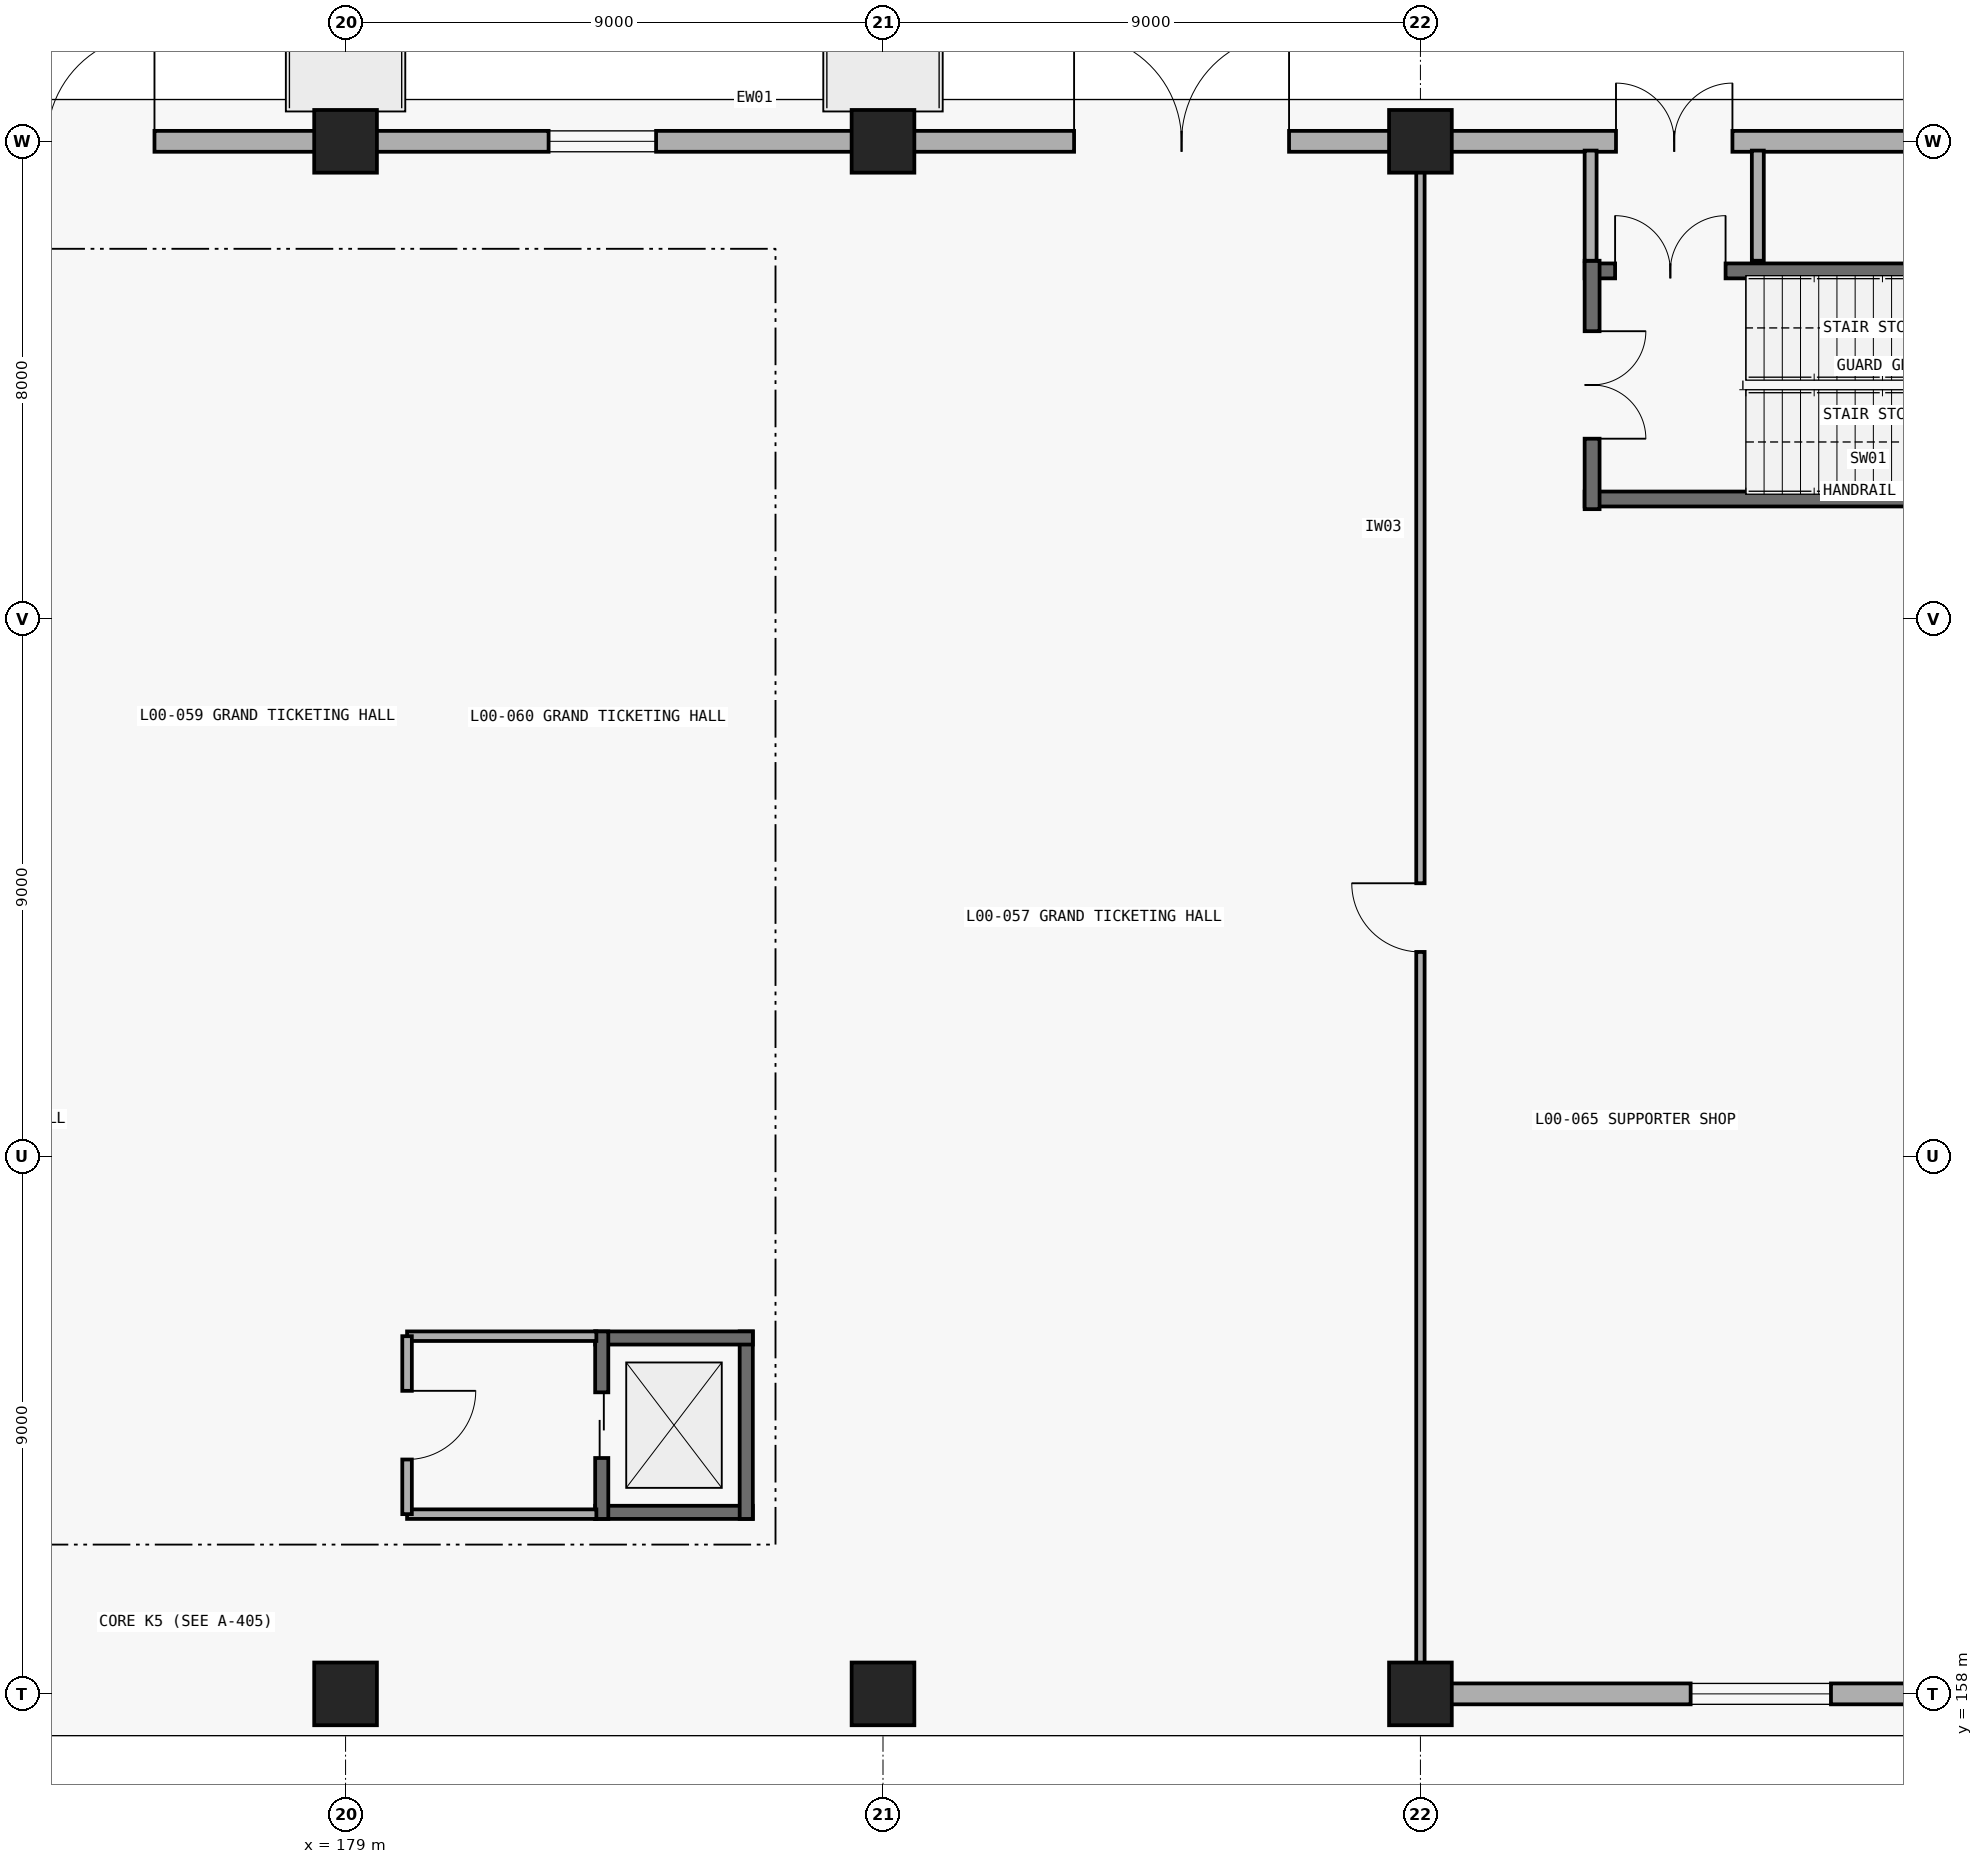
"""IFC4 building model, lengths in metres.
Left out: names, types, materials, properties, quantities, classifications, styles, units other than length and angle.
Written with IfcOpenShell. Run it as: python <this file> out.ifc"""

import sys

from ifc_helpers import new_model, si_unit, direction, frame, frame_2d, origin, origin_2d, place, context, subcontext, project, spatial, rectangle, extrude, element, fill, save


model = new_model("IFC4")
c1 = context("Model", 3, precision=1e-05, world=origin(), true_north=direction((0.0, 1.0)))
c2 = subcontext(c1, "Body", "Model", "MODEL_VIEW")
j1 = project(units=[si_unit("LENGTHUNIT", "METRE"), si_unit("PLANEANGLEUNIT", "RADIAN")], contexts=[c1])
p1 = place(None, origin())
s1 = spatial("IfcSite", under=j1, at=p1, CompositionType="ELEMENT")
p2 = place(p1, origin())
s2 = spatial("IfcBuilding", under=s1, at=p2, CompositionType="ELEMENT")
p3 = place(p2, origin())
s3 = spatial("IfcBuildingStorey", under=s2, at=p3, CompositionType="ELEMENT", Elevation=0.0)
for number, where, z_axis, x_axis in (
    (1, (179.0, 158.0, 0.0), (0.0, 0.0, 1.0), (1.0, 0.0, 0.0)),
    (2, (179.0, 184.0, 0.0), (0.0, 0.0, 1.0), (1.0, 0.0, 0.0)),
    (3, (188.0, 158.0, 0.0), (0.0, 0.0, 1.0), (1.0, 0.0, 0.0)),
    (4, (188.0, 184.0, 0.0), (0.0, 0.0, 1.0), (1.0, 0.0, 0.0)),
    (5, (197.0, 158.0, 0.0), (0.0, 0.0, 1.0), (1.0, 0.0, 0.0)),
    (6, (197.0, 184.0, 0.0), (0.0, 0.0, 1.0), (1.0, 0.0, 0.0)),
):
    element("IfcColumn", number, at=place(p3, frame(where, z_axis=z_axis, x_axis=x_axis)), inside=s3, PredefinedType="COLUMN", context=c2, shape_type="SweptSolid", body=[
        extrude(rectangle(XDim=1.05, YDim=1.05, at=origin_2d()), origin(), (0.0, 0.0, 1.0), 5.4),
    ])
p4 = place(p3, frame((157.593, 156.929, 0.0), z_axis=(0.0, 0.0, 1.0), x_axis=(0.842308733224, -0.538995359845, 0.0)))
e7 = element("IfcWall", 7, at=p4, inside=s3, PredefinedType="STANDARD", context=c2, shape_type="SweptSolid", body=[
    extrude(rectangle(XDim=21.139, YDim=0.35, at=frame_2d((10.57, 0.0))), origin(), (0.0, 0.0, 1.0), 4.165),
])
p5 = place(p4, frame((12.556, 0.0, 0.0)))
e8 = element("IfcOpeningElement", 8, at=p5, cuts=e7, PredefinedType="OPENING", context=c2, shape_type="SweptSolid", body=[
    extrude(rectangle(XDim=1.95, YDim=2.25, at=frame_2d((0.975, 1.125))), frame((0.0, 0.185, 0.0), z_axis=(0.0, -1.0, 0.0), x_axis=(1.0, 0.0, 0.0)), (0.0, 0.0, 1.0), 0.37),
])
p6 = place(p4, frame((1.46, 0.0, 0.0)))
e9 = element("IfcOpeningElement", 9, at=p6, cuts=e7, PredefinedType="OPENING", context=c2, shape_type="SweptSolid", body=[
    extrude(rectangle(XDim=3.0, YDim=2.55, at=frame_2d((1.5, 1.275))), frame((0.0, 0.185, 0.0), z_axis=(0.0, -1.0, 0.0), x_axis=(1.0, 0.0, 0.0)), (0.0, 0.0, 1.0), 0.37),
])
p7 = place(p3, frame((170.5, 184.0, 0.0), z_axis=(0.0, 0.0, 1.0), x_axis=(1.0, 0.0, 0.0)))
e10 = element("IfcWall", 10, at=p7, inside=s3, PredefinedType="STANDARD", context=c2, shape_type="SweptSolid", body=[
    extrude(rectangle(XDim=8.0, YDim=0.35, at=frame_2d((4.0, 0.0))), origin(), (0.0, 0.0, 1.0), 4.384),
])
p8 = place(p7, frame((1.7, 0.0, 0.0)))
e11 = element("IfcOpeningElement", 11, at=p8, cuts=e10, PredefinedType="OPENING", context=c2, shape_type="SweptSolid", body=[
    extrude(rectangle(XDim=3.6, YDim=2.7, at=frame_2d((1.8, 1.35))), frame((0.0, 0.185, 0.0), z_axis=(0.0, -1.0, 0.0), x_axis=(1.0, 0.0, 0.0)), (0.0, 0.0, 1.0), 0.37),
])
p9 = place(p3, frame((179.5, 184.0, 0.0), z_axis=(0.0, 0.0, 1.0), x_axis=(1.0, 0.0, 0.0)))
e12 = element("IfcWall", 12, at=p9, inside=s3, PredefinedType="STANDARD", context=c2, shape_type="SweptSolid", body=[
    extrude(rectangle(XDim=8.0, YDim=0.35, at=frame_2d((4.0, 0.0))), origin(), (0.0, 0.0, 1.0), 4.384),
])
p10 = place(p9, frame((2.9, 0.0, 0.95)))
e13 = element("IfcOpeningElement", 13, at=p10, cuts=e12, PredefinedType="OPENING", context=c2, shape_type="SweptSolid", body=[
    extrude(rectangle(XDim=1.8, YDim=2.2, at=frame_2d((0.9, 1.1))), frame((0.0, 0.185, 0.0), z_axis=(0.0, -1.0, 0.0), x_axis=(1.0, 0.0, 0.0)), (0.0, 0.0, 1.0), 0.37),
])
p11 = place(p3, frame((188.5, 184.0, 0.0), z_axis=(0.0, 0.0, 1.0), x_axis=(1.0, 0.0, 0.0)))
e14 = element("IfcWall", 14, at=p11, inside=s3, PredefinedType="STANDARD", context=c2, shape_type="SweptSolid", body=[
    extrude(rectangle(XDim=8.0, YDim=0.35, at=frame_2d((4.0, 0.0))), origin(), (0.0, 0.0, 1.0), 4.384),
])
p12 = place(p11, frame((2.7, 0.0, 0.0)))
e15 = element("IfcOpeningElement", 15, at=p12, cuts=e14, PredefinedType="OPENING", context=c2, shape_type="SweptSolid", body=[
    extrude(rectangle(XDim=3.6, YDim=2.7, at=frame_2d((1.8, 1.35))), frame((0.0, 0.185, 0.0), z_axis=(0.0, -1.0, 0.0), x_axis=(1.0, 0.0, 0.0)), (0.0, 0.0, 1.0), 0.37),
])
p13 = place(p3, frame((197.5, 184.0, 0.0), z_axis=(0.0, 0.0, 1.0), x_axis=(1.0, 0.0, 0.0)))
e16 = element("IfcWall", 16, at=p13, inside=s3, PredefinedType="STANDARD", context=c2, shape_type="SweptSolid", body=[
    extrude(rectangle(XDim=8.0, YDim=0.35, at=frame_2d((4.0, 0.0))), origin(), (0.0, 0.0, 1.0), 4.384),
])
p14 = place(p13, frame((2.775, 0.0, 0.0)))
e17 = element("IfcOpeningElement", 17, at=p14, cuts=e16, PredefinedType="OPENING", context=c2, shape_type="SweptSolid", body=[
    extrude(rectangle(XDim=1.95, YDim=2.25, at=frame_2d((0.975, 1.125))), frame((0.0, 0.185, 0.0), z_axis=(0.0, -1.0, 0.0), x_axis=(1.0, 0.0, 0.0)), (0.0, 0.0, 1.0), 0.37),
])
p15 = place(p3, frame((205.5, 158.0, 0.0), z_axis=(0.0, 0.0, 1.0), x_axis=(-1.0, 0.0, 0.0)))
e18 = element("IfcWall", 18, at=p15, inside=s3, PredefinedType="STANDARD", context=c2, shape_type="SweptSolid", body=[
    extrude(rectangle(XDim=8.0, YDim=0.35, at=frame_2d((4.0, 0.0))), origin(), (0.0, 0.0, 1.0), 4.384),
])
p16 = place(p15, frame((1.625, 0.0, 0.95)))
e19 = element("IfcOpeningElement", 19, at=p16, cuts=e18, PredefinedType="OPENING", context=c2, shape_type="SweptSolid", body=[
    extrude(rectangle(XDim=2.35, YDim=2.0, at=frame_2d((1.175, 1.0))), frame((0.0, 0.185, 0.0), z_axis=(0.0, -1.0, 0.0), x_axis=(1.0, 0.0, 0.0)), (0.0, 0.0, 1.0), 0.37),
])
p17 = place(p3, frame((199.75, 178.01, 0.0), z_axis=(0.0, 0.0, 1.0), x_axis=(1.0, 0.0, 0.0)))
e20 = element("IfcWall", 20, at=p17, inside=s3, PredefinedType="SHEAR", context=c2, shape_type="SweptSolid", body=[
    extrude(rectangle(XDim=9.5, YDim=0.25, at=frame_2d((4.75, 0.0))), origin(), (0.0, 0.0, 1.0), 5.1),
])
p18 = place(p3, frame((199.75, 181.83, 0.0), z_axis=(0.0, 0.0, 1.0), x_axis=(1.0, 0.0, 0.0)))
e21 = element("IfcWall", 21, at=p18, inside=s3, PredefinedType="SHEAR", context=c2, shape_type="SweptSolid", body=[
    extrude(rectangle(XDim=9.5, YDim=0.25, at=frame_2d((4.75, 0.0))), origin(), (0.0, 0.0, 1.0), 5.1),
])
p19 = place(p18, frame((0.51, 0.0, 0.0)))
e22 = element("IfcOpeningElement", 22, at=p19, cuts=e21, PredefinedType="OPENING", context=c2, shape_type="SweptSolid", body=[
    extrude(rectangle(XDim=1.85, YDim=2.3, at=frame_2d((0.925, 1.15))), frame((0.0, 0.135, 0.0), z_axis=(0.0, -1.0, 0.0), x_axis=(1.0, 0.0, 0.0)), (0.0, 0.0, 1.0), 0.27),
])
p20 = place(p3, frame((199.875, 182.0, 0.0), z_axis=(0.0, 0.0, 1.0), x_axis=(0.0, -1.0, 0.0)))
e23 = element("IfcWall", 23, at=p20, inside=s3, PredefinedType="SHEAR", context=c2, shape_type="SweptSolid", body=[
    extrude(rectangle(XDim=4.16, YDim=0.25, at=frame_2d((2.08, 0.0))), origin(), (0.0, 0.0, 1.0), 5.1),
])
p21 = place(p20, frame((1.18, 0.0, 0.0)))
e24 = element("IfcOpeningElement", 24, at=p21, cuts=e23, PredefinedType="OPENING", context=c2, shape_type="SweptSolid", body=[
    extrude(rectangle(XDim=1.8, YDim=2.25, at=frame_2d((0.9, 1.125))), frame((0.0, 0.135, 0.0), z_axis=(0.0, -1.0, 0.0), x_axis=(1.0, 0.0, 0.0)), (0.0, 0.0, 1.0), 0.27),
])
for number, where, z_axis, x_axis in (
    (25, (199.85, 182.0, 0.0), (0.0, 0.0, 1.0), (0.0, 1.0, 0.0)),
    (26, (202.65, 182.0, 0.0), (0.0, 0.0, 1.0), (0.0, 1.0, 0.0)),
):
    element("IfcWall", number, at=place(p3, frame(where, z_axis=z_axis, x_axis=x_axis)), inside=s3, PredefinedType="PARTITIONING", context=c2, shape_type="SweptSolid", body=[
        extrude(rectangle(XDim=1.845, YDim=0.2, at=frame_2d((0.922, 0.0))), origin(), (0.0, 0.0, 1.0), 4.384),
    ])
p22 = place(p3, frame((183.18, 161.04, 0.0), z_axis=(0.0, 0.0, 1.0), x_axis=(1.0, 0.0, 0.0)))
e27 = element("IfcWall", 27, at=p22, inside=s3, PredefinedType="SHEAR", context=c2, shape_type="SweptSolid", body=[
    extrude(rectangle(XDim=2.64, YDim=0.22, at=frame_2d((1.32, 0.0))), origin(), (0.0, 0.0, 1.0), 5.1),
])
p23 = place(p3, frame((185.71, 160.93, 0.0), z_axis=(0.0, 0.0, 1.0), x_axis=(0.0, 1.0, 0.0)))
e28 = element("IfcWall", 28, at=p23, inside=s3, PredefinedType="SHEAR", context=c2, shape_type="SweptSolid", body=[
    extrude(rectangle(XDim=3.14, YDim=0.22, at=frame_2d((1.57, 0.0))), origin(), (0.0, 0.0, 1.0), 5.1),
])
p24 = place(p3, frame((185.82, 163.96, 0.0), z_axis=(0.0, 0.0, 1.0), x_axis=(-1.0, 0.0, 0.0)))
e29 = element("IfcWall", 29, at=p24, inside=s3, PredefinedType="SHEAR", context=c2, shape_type="SweptSolid", body=[
    extrude(rectangle(XDim=2.64, YDim=0.22, at=frame_2d((1.32, 0.0))), origin(), (0.0, 0.0, 1.0), 5.1),
])
p25 = place(p3, frame((183.29, 164.07, 0.0), z_axis=(0.0, 0.0, 1.0), x_axis=(0.0, -1.0, 0.0)))
e30 = element("IfcWall", 30, at=p25, inside=s3, PredefinedType="SHEAR", context=c2, shape_type="SweptSolid", body=[
    extrude(rectangle(XDim=3.14, YDim=0.22, at=frame_2d((1.57, 0.0))), origin(), (0.0, 0.0, 1.0), 5.1),
])
p26 = place(p25, frame((1.02, 0.0, 0.0)))
e31 = element("IfcOpeningElement", 31, at=p26, cuts=e30, PredefinedType="OPENING", context=c2, shape_type="SweptSolid", body=[
    extrude(rectangle(XDim=1.1, YDim=2.15, at=frame_2d((0.55, 1.075))), frame((0.0, 0.12, 0.0), z_axis=(0.0, -1.0, 0.0), x_axis=(1.0, 0.0, 0.0)), (0.0, 0.0, 1.0), 0.24),
])
for number, where, z_axis, x_axis in (
    (32, (183.2, 163.99, 0.0), (0.0, 0.0, 1.0), (-1.0, 0.0, 0.0)),
    (33, (183.2, 161.01, 0.0), (0.0, 0.0, 1.0), (-1.0, 0.0, 0.0)),
):
    element("IfcWall", number, at=place(p3, frame(where, z_axis=z_axis, x_axis=x_axis)), inside=s3, PredefinedType="PARTITIONING", context=c2, shape_type="SweptSolid", body=[
        extrude(rectangle(XDim=3.17, YDim=0.16, at=frame_2d((1.585, 0.0))), origin(), (0.0, 0.0, 1.0), 5.08),
    ])
p27 = place(p3, frame((180.03, 163.99, 0.0), z_axis=(0.0, 0.0, 1.0), x_axis=(0.0, -1.0, 0.0)))
e34 = element("IfcWall", 34, at=p27, inside=s3, PredefinedType="PARTITIONING", context=c2, shape_type="SweptSolid", body=[
    extrude(rectangle(XDim=2.98, YDim=0.16, at=frame_2d((1.49, 0.0))), origin(), (0.0, 0.0, 1.0), 5.08),
])
p28 = place(p27, frame((0.915, 0.0, 0.0)))
e35 = element("IfcOpeningElement", 35, at=p28, cuts=e34, PredefinedType="OPENING", context=c2, shape_type="SweptSolid", body=[
    extrude(rectangle(XDim=1.15, YDim=2.2, at=frame_2d((0.575, 1.1))), frame((0.0, 0.09, 0.0), z_axis=(0.0, -1.0, 0.0), x_axis=(1.0, 0.0, 0.0)), (0.0, 0.0, 1.0), 0.18),
])
p29 = place(p3, frame((197.0, 158.51, 0.0), z_axis=(0.0, 0.0, 1.0), x_axis=(0.0, 1.0, 0.0)))
e36 = element("IfcWall", 36, at=p29, inside=s3, PredefinedType="PARTITIONING", context=c2, shape_type="SweptSolid", body=[
    extrude(rectangle(XDim=24.98, YDim=0.14, at=frame_2d((12.49, 0.0))), origin(), (0.0, 0.0, 1.0), 5.08),
])
p30 = place(p29, frame((11.915, 0.0, 0.0)))
e37 = element("IfcOpeningElement", 37, at=p30, cuts=e36, PredefinedType="OPENING", context=c2, shape_type="SweptSolid", body=[
    extrude(rectangle(XDim=1.15, YDim=2.2, at=frame_2d((0.575, 1.1))), frame((0.0, 0.08, 0.0), z_axis=(0.0, -1.0, 0.0), x_axis=(1.0, 0.0, 0.0)), (0.0, 0.0, 1.0), 0.16),
])
p31 = place(p8, origin())
e38 = element("IfcDoor", 38, at=p31, inside=s3, OperationType="DOUBLE_DOOR_SINGLE_SWING", PredefinedType="DOOR", context=c2, shape_type="SweptSolid", body=[
    extrude(rectangle(XDim=3.6, YDim=2.7, at=frame_2d((1.8, 1.35))), frame((0.0, 0.025, 0.0), z_axis=(0.0, -1.0, 0.0), x_axis=(1.0, 0.0, 0.0)), (0.0, 0.0, 1.0), 0.05),
])
fill(e11, e38)
p32 = place(p10, origin())
e39 = element("IfcWindow", 39, at=p32, inside=s3, PartitioningType="SINGLE_PANEL", PredefinedType="WINDOW", context=c2, shape_type="SweptSolid", body=[
    extrude(rectangle(XDim=1.8, YDim=2.2, at=frame_2d((0.9, 1.1))), frame((0.0, 0.03, 0.0), z_axis=(0.0, -1.0, 0.0), x_axis=(1.0, 0.0, 0.0)), (0.0, 0.0, 1.0), 0.06),
])
fill(e13, e39)
p33 = place(p12, origin())
e40 = element("IfcDoor", 40, at=p33, inside=s3, OperationType="DOUBLE_DOOR_SINGLE_SWING", PredefinedType="DOOR", context=c2, shape_type="SweptSolid", body=[
    extrude(rectangle(XDim=3.6, YDim=2.7, at=frame_2d((1.8, 1.35))), frame((0.0, 0.025, 0.0), z_axis=(0.0, -1.0, 0.0), x_axis=(1.0, 0.0, 0.0)), (0.0, 0.0, 1.0), 0.05),
])
fill(e15, e40)
p34 = place(p14, origin())
e41 = element("IfcDoor", 41, at=p34, inside=s3, OperationType="DOUBLE_DOOR_SINGLE_SWING", PredefinedType="DOOR", context=c2, shape_type="SweptSolid", body=[
    extrude(rectangle(XDim=1.95, YDim=2.25, at=frame_2d((0.975, 1.125))), frame((0.0, 0.025, 0.0), z_axis=(0.0, -1.0, 0.0), x_axis=(1.0, 0.0, 0.0)), (0.0, 0.0, 1.0), 0.05),
])
fill(e17, e41)
p35 = place(p16, origin())
e42 = element("IfcWindow", 42, at=p35, inside=s3, PartitioningType="SINGLE_PANEL", PredefinedType="WINDOW", context=c2, shape_type="SweptSolid", body=[
    extrude(rectangle(XDim=2.35, YDim=2.0, at=frame_2d((1.175, 1.0))), frame((0.0, 0.03, 0.0), z_axis=(0.0, -1.0, 0.0), x_axis=(1.0, 0.0, 0.0)), (0.0, 0.0, 1.0), 0.06),
])
fill(e19, e42)
p36 = place(p21, origin())
e43 = element("IfcDoor", 43, at=p36, inside=s3, OperationType="DOUBLE_DOOR_SINGLE_SWING", PredefinedType="DOOR", context=c2, shape_type="SweptSolid", body=[
    extrude(rectangle(XDim=1.8, YDim=2.25, at=frame_2d((0.9, 1.125))), frame((0.0, 0.025, 0.0), z_axis=(0.0, -1.0, 0.0), x_axis=(1.0, 0.0, 0.0)), (0.0, 0.0, 1.0), 0.05),
])
fill(e24, e43)
p37 = place(p19, origin())
e44 = element("IfcDoor", 44, at=p37, inside=s3, OperationType="DOUBLE_DOOR_SINGLE_SWING", PredefinedType="DOOR", context=c2, shape_type="SweptSolid", body=[
    extrude(rectangle(XDim=1.85, YDim=2.3, at=frame_2d((0.925, 1.15))), frame((0.0, 0.025, 0.0), z_axis=(0.0, -1.0, 0.0), x_axis=(1.0, 0.0, 0.0)), (0.0, 0.0, 1.0), 0.05),
])
fill(e22, e44)
p38 = place(p26, origin())
e45 = element("IfcDoor", 45, at=p38, inside=s3, OperationType="SLIDING_TO_LEFT", PredefinedType="DOOR", context=c2, shape_type="SweptSolid", body=[
    extrude(rectangle(XDim=1.1, YDim=2.15, at=frame_2d((0.55, 1.075))), frame((0.0, 0.025, 0.0), z_axis=(0.0, -1.0, 0.0), x_axis=(1.0, 0.0, 0.0)), (0.0, 0.0, 1.0), 0.05),
])
fill(e31, e45)
p39 = place(p28, origin())
e46 = element("IfcDoor", 46, at=p39, inside=s3, OperationType="SINGLE_SWING_LEFT", PredefinedType="DOOR", context=c2, shape_type="SweptSolid", body=[
    extrude(rectangle(XDim=1.15, YDim=2.2, at=frame_2d((0.575, 1.1))), frame((0.0, 0.025, 0.0), z_axis=(0.0, -1.0, 0.0), x_axis=(1.0, 0.0, 0.0)), (0.0, 0.0, 1.0), 0.05),
])
fill(e35, e46)
p40 = place(p30, origin())
e47 = element("IfcDoor", 47, at=p40, inside=s3, OperationType="SINGLE_SWING_RIGHT", PredefinedType="DOOR", context=c2, shape_type="SweptSolid", body=[
    extrude(rectangle(XDim=1.15, YDim=2.2, at=frame_2d((0.575, 1.1))), frame((0.0, 0.025, 0.0), z_axis=(0.0, -1.0, 0.0), x_axis=(1.0, 0.0, 0.0)), (0.0, 0.0, 1.0), 0.05),
])
fill(e37, e47)
save(model, sys.argv[1])
